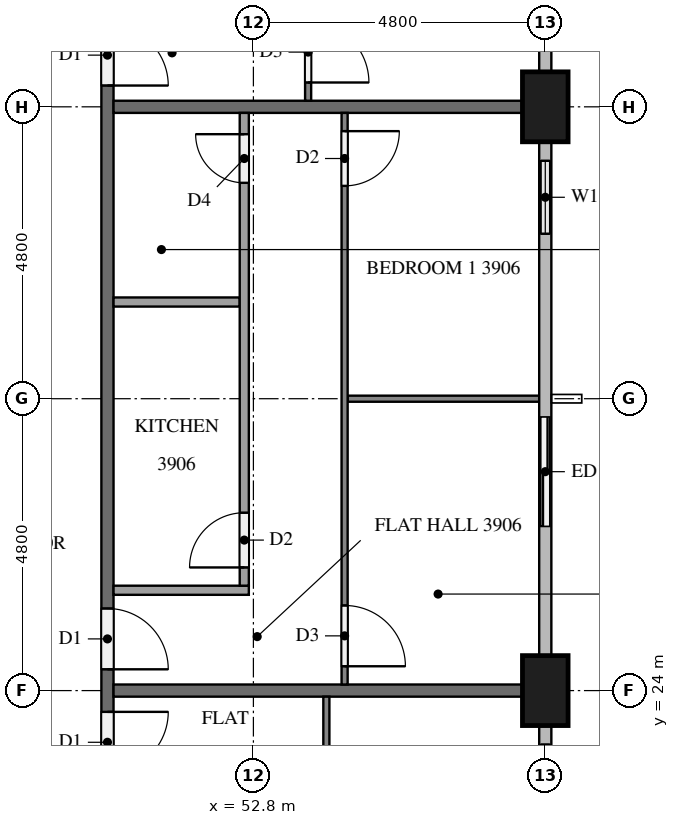
"""IFC4 building model, lengths in metres.
Left out: names, types, materials, properties, quantities, classifications, styles, units other than length and angle.
Written with IfcOpenShell. Run it as: python <this file> out.ifc"""

import sys

from ifc_helpers import new_model, si_unit, direction, frame, frame_2d, origin, origin_2d, place, context, subcontext, project, spatial, rectangle, extrude, element, fill, save


model = new_model("IFC4")
c1 = context("Model", 3, precision=1e-05, world=origin(), true_north=direction((0.0, 1.0)))
c2 = subcontext(c1, "Body", "Model", "MODEL_VIEW")
j1 = project(units=[si_unit("LENGTHUNIT", "METRE"), si_unit("PLANEANGLEUNIT", "RADIAN")], contexts=[c1])
p1 = place(None, origin())
s1 = spatial("IfcSite", under=j1, at=p1, CompositionType="ELEMENT")
p2 = place(p1, origin())
s2 = spatial("IfcBuilding", under=s1, at=p2, CompositionType="ELEMENT")
p3 = place(p2, frame((0.0, 0.0, 152.5)))
s3 = spatial("IfcBuildingStorey", under=s2, at=p3, CompositionType="ELEMENT", Elevation=152.5)
for number, where, z_axis, x_axis in (
    (1, (57.6, 24.0, 0.0), (0.0, 0.0, 1.0), (0.0, 1.0, 0.0)),
    (2, (57.6, 33.6, 0.0), (0.0, 0.0, 1.0), (0.0, 1.0, 0.0)),
):
    element("IfcColumn", number, at=place(p3, frame(where, z_axis=z_axis, x_axis=x_axis)), inside=s3, PredefinedType="COLUMN", context=c2, shape_type="SweptSolid", body=[
        extrude(rectangle(XDim=1.15, YDim=0.75, at=origin_2d()), origin(), (0.0, 0.0, 1.0), 3.2),
    ])
p4 = place(p3, frame((57.6, 21.6, 0.0), z_axis=(0.0, 0.0, 1.0), x_axis=(0.0, 1.0, 0.0)))
e3 = element("IfcWall", 3, at=p4, inside=s3, PredefinedType="SOLIDWALL", context=c2, shape_type="SweptSolid", body=[
    extrude(rectangle(XDim=1.825, YDim=0.15, at=frame_2d((0.913, 0.0))), origin(), (0.0, 0.0, 1.0), 3.2),
])
p5 = place(p4, frame((0.312, 0.0, 0.9)))
e4 = element("IfcOpeningElement", 4, at=p5, cuts=e3, PredefinedType="OPENING", context=c2, shape_type="SweptSolid", body=[
    extrude(rectangle(XDim=1.2, YDim=1.4, at=frame_2d((0.6, 0.7))), frame((0.0, 0.085, 0.0), z_axis=(0.0, -1.0, 0.0), x_axis=(1.0, 0.0, 0.0)), (0.0, 0.0, 1.0), 0.17),
])
p6 = place(p3, frame((57.6, 26.4, 0.0), z_axis=(0.0, 0.0, 1.0), x_axis=(0.0, 1.0, 0.0)))
e5 = element("IfcWall", 5, at=p6, inside=s3, PredefinedType="SOLIDWALL", context=c2, shape_type="SweptSolid", body=[
    extrude(rectangle(XDim=2.4, YDim=0.15, at=frame_2d((1.2, 0.0))), origin(), (0.0, 0.0, 1.0), 3.2),
])
p7 = place(p6, frame((0.3, 0.0, 0.0)))
e6 = element("IfcOpeningElement", 6, at=p7, cuts=e5, PredefinedType="OPENING", context=c2, shape_type="SweptSolid", body=[
    extrude(rectangle(XDim=1.8, YDim=2.4, at=frame_2d((0.9, 1.2))), frame((0.0, 0.085, 0.0), z_axis=(0.0, -1.0, 0.0), x_axis=(1.0, 0.0, 0.0)), (0.0, 0.0, 1.0), 0.17),
])
p8 = place(p3, frame((57.6, 31.2, 0.0), z_axis=(0.0, 0.0, 1.0), x_axis=(0.0, 1.0, 0.0)))
e7 = element("IfcWall", 7, at=p8, inside=s3, PredefinedType="SOLIDWALL", context=c2, shape_type="SweptSolid", body=[
    extrude(rectangle(XDim=1.825, YDim=0.15, at=frame_2d((0.913, 0.0))), origin(), (0.0, 0.0, 1.0), 3.2),
])
p9 = place(p8, frame((0.312, 0.0, 0.9)))
e8 = element("IfcOpeningElement", 8, at=p9, cuts=e7, PredefinedType="OPENING", context=c2, shape_type="SweptSolid", body=[
    extrude(rectangle(XDim=1.2, YDim=1.4, at=frame_2d((0.6, 0.7))), frame((0.0, 0.085, 0.0), z_axis=(0.0, -1.0, 0.0), x_axis=(1.0, 0.0, 0.0)), (0.0, 0.0, 1.0), 0.17),
])
p10 = place(p3, frame((50.4, 40.7, 0.0), z_axis=(0.0, 0.0, 1.0), x_axis=(0.0, -1.0, 0.0)))
e9 = element("IfcWall", 9, at=p10, inside=s3, PredefinedType="PARTITIONING", context=c2, shape_type="SweptSolid", body=[
    extrude(rectangle(XDim=28.6, YDim=0.2, at=frame_2d((14.3, 0.0))), origin(), (0.0, 0.0, 1.0), 3.2),
])
p11 = place(p10, frame((17.05, 0.0, 0.0)))
e10 = element("IfcOpeningElement", 10, at=p11, cuts=e9, PredefinedType="OPENING", context=c2, shape_type="SweptSolid", body=[
    extrude(rectangle(XDim=1.0, YDim=2.1, at=frame_2d((0.5, 1.05))), frame((0.0, 0.11, 0.0), z_axis=(0.0, -1.0, 0.0), x_axis=(1.0, 0.0, 0.0)), (0.0, 0.0, 1.0), 0.22),
])
p12 = place(p10, frame((15.35, 0.0, 0.0)))
e11 = element("IfcOpeningElement", 11, at=p12, cuts=e9, PredefinedType="OPENING", context=c2, shape_type="SweptSolid", body=[
    extrude(rectangle(XDim=1.0, YDim=2.1, at=frame_2d((0.5, 1.05))), frame((0.0, 0.11, 0.0), z_axis=(0.0, -1.0, 0.0), x_axis=(1.0, 0.0, 0.0)), (0.0, 0.0, 1.0), 0.22),
])
p13 = place(p10, frame((5.75, 0.0, 0.0)))
e12 = element("IfcOpeningElement", 12, at=p13, cuts=e9, PredefinedType="OPENING", context=c2, shape_type="SweptSolid", body=[
    extrude(rectangle(XDim=1.0, YDim=2.1, at=frame_2d((0.5, 1.05))), frame((0.0, 0.11, 0.0), z_axis=(0.0, -1.0, 0.0), x_axis=(1.0, 0.0, 0.0)), (0.0, 0.0, 1.0), 0.22),
])
for number, where, z_axis, x_axis in (
    (13, (50.5, 24.0, 0.0), (0.0, 0.0, 1.0), (1.0, 0.0, 0.0)),
    (14, (50.5, 33.6, 0.0), (0.0, 0.0, 1.0), (1.0, 0.0, 0.0)),
):
    element("IfcWall", number, at=place(p3, frame(where, z_axis=z_axis, x_axis=x_axis)), inside=s3, PredefinedType="PARTITIONING", context=c2, shape_type="SweptSolid", body=[
        extrude(rectangle(XDim=6.725, YDim=0.2, at=frame_2d((3.363, 0.0))), origin(), (0.0, 0.0, 1.0), 3.2),
    ])
p14 = place(p3, frame((54.0, 23.9, 0.0), z_axis=(0.0, 0.0, 1.0), x_axis=(0.0, -1.0, 0.0)))
e15 = element("IfcWall", 15, at=p14, inside=s3, PredefinedType="PARTITIONING", context=c2, shape_type="SweptSolid", body=[
    extrude(rectangle(XDim=11.8, YDim=0.1, at=frame_2d((5.9, 0.0))), origin(), (0.0, 0.0, 1.0), 3.2),
])
p15 = place(p14, frame((3.45, 0.0, 0.0)))
e16 = element("IfcOpeningElement", 16, at=p15, cuts=e15, PredefinedType="OPENING", context=c2, shape_type="SweptSolid", body=[
    extrude(rectangle(XDim=0.9, YDim=2.1, at=frame_2d((0.45, 1.05))), frame((0.0, 0.06, 0.0), z_axis=(0.0, -1.0, 0.0), x_axis=(1.0, 0.0, 0.0)), (0.0, 0.0, 1.0), 0.12),
])
p16 = place(p14, frame((5.05, 0.0, 0.0)))
e17 = element("IfcOpeningElement", 17, at=p16, cuts=e15, PredefinedType="OPENING", context=c2, shape_type="SweptSolid", body=[
    extrude(rectangle(XDim=1.0, YDim=2.1, at=frame_2d((0.5, 1.05))), frame((0.0, 0.06, 0.0), z_axis=(0.0, -1.0, 0.0), x_axis=(1.0, 0.0, 0.0)), (0.0, 0.0, 1.0), 0.12),
])
p17 = place(p3, frame((54.35, 28.8, 0.0), z_axis=(0.0, 0.0, 1.0), x_axis=(1.0, 0.0, 0.0)))
e18 = element("IfcWall", 18, at=p17, inside=s3, PredefinedType="PARTITIONING", context=c2, shape_type="SweptSolid", body=[
    extrude(rectangle(XDim=3.15, YDim=0.1, at=frame_2d((1.575, 0.0))), origin(), (0.0, 0.0, 1.0), 3.2),
])
p18 = place(p3, frame((54.3, 33.5, 0.0), z_axis=(0.0, 0.0, 1.0), x_axis=(0.0, -1.0, 0.0)))
e19 = element("IfcWall", 19, at=p18, inside=s3, PredefinedType="PARTITIONING", context=c2, shape_type="SweptSolid", body=[
    extrude(rectangle(XDim=9.4, YDim=0.1, at=frame_2d((4.7, 0.0))), origin(), (0.0, 0.0, 1.0), 3.2),
])
p19 = place(p18, frame((8.1, 0.0, 0.0)))
e20 = element("IfcOpeningElement", 20, at=p19, cuts=e19, PredefinedType="OPENING", context=c2, shape_type="SweptSolid", body=[
    extrude(rectangle(XDim=1.0, YDim=2.1, at=frame_2d((0.5, 1.05))), frame((0.0, 0.06, 0.0), z_axis=(0.0, -1.0, 0.0), x_axis=(1.0, 0.0, 0.0)), (0.0, 0.0, 1.0), 0.12),
])
p20 = place(p18, frame((0.3, 0.0, 0.0)))
e21 = element("IfcOpeningElement", 21, at=p20, cuts=e19, PredefinedType="OPENING", context=c2, shape_type="SweptSolid", body=[
    extrude(rectangle(XDim=0.9, YDim=2.1, at=frame_2d((0.45, 1.05))), frame((0.0, 0.06, 0.0), z_axis=(0.0, -1.0, 0.0), x_axis=(1.0, 0.0, 0.0)), (0.0, 0.0, 1.0), 0.12),
])
p21 = place(p3, frame((50.5, 30.39, 0.0), z_axis=(0.0, 0.0, 1.0), x_axis=(1.0, 0.0, 0.0)))
e22 = element("IfcWall", 22, at=p21, inside=s3, PredefinedType="PARTITIONING", context=c2, shape_type="SweptSolid", body=[
    extrude(rectangle(XDim=2.075, YDim=0.15, at=frame_2d((1.038, 0.0))), origin(), (0.0, 0.0, 1.0), 3.2),
])
p22 = place(p3, frame((50.5, 25.65, 0.0), z_axis=(0.0, 0.0, 1.0), x_axis=(1.0, 0.0, 0.0)))
e23 = element("IfcWall", 23, at=p22, inside=s3, PredefinedType="PARTITIONING", context=c2, shape_type="SweptSolid", body=[
    extrude(rectangle(XDim=2.225, YDim=0.15, at=frame_2d((1.113, 0.0))), origin(), (0.0, 0.0, 1.0), 3.2),
])
p23 = place(p3, frame((52.65, 25.725, 0.0), z_axis=(0.0, 0.0, 1.0), x_axis=(0.0, 1.0, 0.0)))
e24 = element("IfcWall", 24, at=p23, inside=s3, PredefinedType="PARTITIONING", context=c2, shape_type="SweptSolid", body=[
    extrude(rectangle(XDim=7.775, YDim=0.15, at=frame_2d((3.887, 0.0))), origin(), (0.0, 0.0, 1.0), 3.2),
])
p24 = place(p23, frame((0.3, 0.0, 0.0)))
e25 = element("IfcOpeningElement", 25, at=p24, cuts=e24, PredefinedType="OPENING", context=c2, shape_type="SweptSolid", body=[
    extrude(rectangle(XDim=0.9, YDim=2.1, at=frame_2d((0.45, 1.05))), frame((0.0, 0.085, 0.0), z_axis=(0.0, -1.0, 0.0), x_axis=(1.0, 0.0, 0.0)), (0.0, 0.0, 1.0), 0.17),
])
p25 = place(p23, frame((6.625, 0.0, 0.0)))
e26 = element("IfcOpeningElement", 26, at=p25, cuts=e24, PredefinedType="OPENING", context=c2, shape_type="SweptSolid", body=[
    extrude(rectangle(XDim=0.8, YDim=2.1, at=frame_2d((0.4, 1.05))), frame((0.0, 0.085, 0.0), z_axis=(0.0, -1.0, 0.0), x_axis=(1.0, 0.0, 0.0)), (0.0, 0.0, 1.0), 0.17),
])
p26 = place(p3, frame((53.7, 40.7, 0.0), z_axis=(0.0, 0.0, 1.0), x_axis=(0.0, -1.0, 0.0)))
e27 = element("IfcWall", 27, at=p26, inside=s3, PredefinedType="PARTITIONING", context=c2, shape_type="SweptSolid", body=[
    extrude(rectangle(XDim=7.0, YDim=0.1, at=frame_2d((3.5, 0.0))), origin(), (0.0, 0.0, 1.0), 3.2),
])
p27 = place(p26, frame((5.7, 0.0, 0.0)))
e28 = element("IfcOpeningElement", 28, at=p27, cuts=e27, PredefinedType="OPENING", context=c2, shape_type="SweptSolid", body=[
    extrude(rectangle(XDim=1.0, YDim=2.1, at=frame_2d((0.5, 1.05))), frame((0.0, 0.06, 0.0), z_axis=(0.0, -1.0, 0.0), x_axis=(1.0, 0.0, 0.0)), (0.0, 0.0, 1.0), 0.12),
])
p28 = place(p5, origin())
e29 = element("IfcWindow", 29, at=p28, inside=s3, PartitioningType="SINGLE_PANEL", PredefinedType="WINDOW", context=c2, shape_type="SweptSolid", body=[
    extrude(rectangle(XDim=1.2, YDim=1.4, at=frame_2d((0.6, 0.7))), frame((0.0, 0.03, 0.0), z_axis=(0.0, -1.0, 0.0), x_axis=(1.0, 0.0, 0.0)), (0.0, 0.0, 1.0), 0.06),
])
fill(e4, e29)
p29 = place(p7, origin())
e30 = element("IfcDoor", 30, at=p29, inside=s3, OperationType="SLIDING_TO_RIGHT", PredefinedType="DOOR", context=c2, shape_type="SweptSolid", body=[
    extrude(rectangle(XDim=1.8, YDim=2.4, at=frame_2d((0.9, 1.2))), frame((0.0, 0.025, 0.0), z_axis=(0.0, -1.0, 0.0), x_axis=(1.0, 0.0, 0.0)), (0.0, 0.0, 1.0), 0.05),
])
fill(e6, e30)
p30 = place(p9, origin())
e31 = element("IfcWindow", 31, at=p30, inside=s3, PartitioningType="SINGLE_PANEL", PredefinedType="WINDOW", context=c2, shape_type="SweptSolid", body=[
    extrude(rectangle(XDim=1.2, YDim=1.4, at=frame_2d((0.6, 0.7))), frame((0.0, 0.03, 0.0), z_axis=(0.0, -1.0, 0.0), x_axis=(1.0, 0.0, 0.0)), (0.0, 0.0, 1.0), 0.06),
])
fill(e8, e31)
p31 = place(p11, origin())
e32 = element("IfcDoor", 32, at=p31, inside=s3, OperationType="SINGLE_SWING_LEFT", PredefinedType="DOOR", context=c2, shape_type="SweptSolid", body=[
    extrude(rectangle(XDim=1.0, YDim=2.1, at=frame_2d((0.5, 1.05))), frame((0.0, 0.025, 0.0), z_axis=(0.0, -1.0, 0.0), x_axis=(1.0, 0.0, 0.0)), (0.0, 0.0, 1.0), 0.05),
])
fill(e10, e32)
p32 = place(p12, origin())
e33 = element("IfcDoor", 33, at=p32, inside=s3, OperationType="SINGLE_SWING_RIGHT", PredefinedType="DOOR", context=c2, shape_type="SweptSolid", body=[
    extrude(rectangle(XDim=1.0, YDim=2.1, at=frame_2d((0.5, 1.05))), frame((0.0, 0.025, 0.0), z_axis=(0.0, -1.0, 0.0), x_axis=(1.0, 0.0, 0.0)), (0.0, 0.0, 1.0), 0.05),
])
fill(e11, e33)
p33 = place(p13, origin())
e34 = element("IfcDoor", 34, at=p33, inside=s3, OperationType="SINGLE_SWING_RIGHT", PredefinedType="DOOR", context=c2, shape_type="SweptSolid", body=[
    extrude(rectangle(XDim=1.0, YDim=2.1, at=frame_2d((0.5, 1.05))), frame((0.0, 0.025, 0.0), z_axis=(0.0, -1.0, 0.0), x_axis=(1.0, 0.0, 0.0)), (0.0, 0.0, 1.0), 0.05),
])
fill(e12, e34)
p34 = place(p19, origin())
e35 = element("IfcDoor", 35, at=p34, inside=s3, OperationType="SINGLE_SWING_RIGHT", PredefinedType="DOOR", context=c2, shape_type="SweptSolid", body=[
    extrude(rectangle(XDim=1.0, YDim=2.1, at=frame_2d((0.5, 1.05))), frame((0.0, 0.025, 0.0), z_axis=(0.0, -1.0, 0.0), x_axis=(1.0, 0.0, 0.0)), (0.0, 0.0, 1.0), 0.05),
])
fill(e20, e35)
p35 = place(p20, origin())
e36 = element("IfcDoor", 36, at=p35, inside=s3, OperationType="SINGLE_SWING_LEFT", PredefinedType="DOOR", context=c2, shape_type="SweptSolid", body=[
    extrude(rectangle(XDim=0.9, YDim=2.1, at=frame_2d((0.45, 1.05))), frame((0.0, 0.025, 0.0), z_axis=(0.0, -1.0, 0.0), x_axis=(1.0, 0.0, 0.0)), (0.0, 0.0, 1.0), 0.05),
])
fill(e21, e36)
p36 = place(p24, origin())
e37 = element("IfcDoor", 37, at=p36, inside=s3, OperationType="SINGLE_SWING_LEFT", PredefinedType="DOOR", context=c2, shape_type="SweptSolid", body=[
    extrude(rectangle(XDim=0.9, YDim=2.1, at=frame_2d((0.45, 1.05))), frame((0.0, 0.025, 0.0), z_axis=(0.0, -1.0, 0.0), x_axis=(1.0, 0.0, 0.0)), (0.0, 0.0, 1.0), 0.05),
])
fill(e25, e37)
p37 = place(p25, origin())
e38 = element("IfcDoor", 38, at=p37, inside=s3, OperationType="SINGLE_SWING_RIGHT", PredefinedType="DOOR", context=c2, shape_type="SweptSolid", body=[
    extrude(rectangle(XDim=0.8, YDim=2.1, at=frame_2d((0.4, 1.05))), frame((0.0, 0.025, 0.0), z_axis=(0.0, -1.0, 0.0), x_axis=(1.0, 0.0, 0.0)), (0.0, 0.0, 1.0), 0.05),
])
fill(e26, e38)
p38 = place(p27, origin())
e39 = element("IfcDoor", 39, at=p38, inside=s3, OperationType="SINGLE_SWING_RIGHT", PredefinedType="DOOR", context=c2, shape_type="SweptSolid", body=[
    extrude(rectangle(XDim=1.0, YDim=2.1, at=frame_2d((0.5, 1.05))), frame((0.0, 0.025, 0.0), z_axis=(0.0, -1.0, 0.0), x_axis=(1.0, 0.0, 0.0)), (0.0, 0.0, 1.0), 0.05),
])
fill(e28, e39)
save(model, sys.argv[1])
